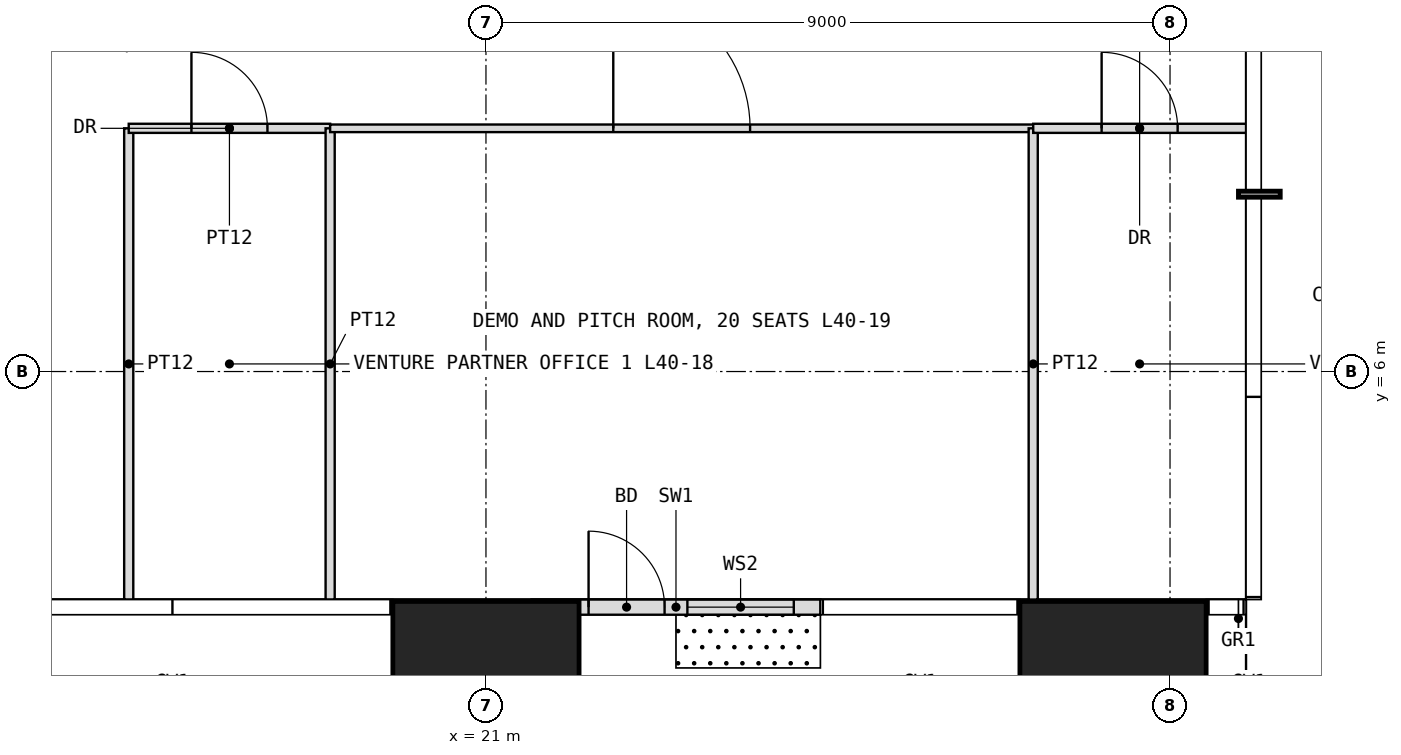
"""IFC4 building model, lengths in metres.
Left out: names, types, materials, properties, quantities, classifications, styles, units other than length and angle.
Written with IfcOpenShell. Run it as: python <this file> out.ifc"""

import sys

from ifc_helpers import new_model, si_unit, direction, frame, frame_2d, origin, origin_2d, place, context, subcontext, project, spatial, rectangle, extrude, element, fill, save


model = new_model("IFC4")
c1 = context("Model", 3, precision=1e-05, world=origin(), true_north=direction((0.0, 1.0)))
c2 = subcontext(c1, "Body", "Model", "MODEL_VIEW")
j1 = project(units=[si_unit("LENGTHUNIT", "METRE"), si_unit("PLANEANGLEUNIT", "RADIAN")], contexts=[c1])
p1 = place(None, origin())
s1 = spatial("IfcSite", under=j1, at=p1, CompositionType="ELEMENT")
p2 = place(p1, origin())
s2 = spatial("IfcBuilding", under=s1, at=p2, CompositionType="ELEMENT")
p3 = place(p2, frame((0.0, 0.0, 170.5)))
s3 = spatial("IfcBuildingStorey", under=s2, at=p3, CompositionType="ELEMENT", Elevation=170.5)
for number, where, z_axis, x_axis in (
    (1, (21.0, 1.75, 0.0), (0.0, 0.0, 1.0), (1.0, 0.0, 0.0)),
    (2, (29.25, 1.75, 0.0), (0.0, 0.0, 1.0), (1.0, 0.0, 0.0)),
):
    element("IfcColumn", number, at=place(p3, frame(where, z_axis=z_axis, x_axis=x_axis)), inside=s3, PredefinedType="COLUMN", context=c2, shape_type="SweptSolid", body=[
        extrude(rectangle(XDim=2.45, YDim=2.45, at=origin_2d()), origin(), (0.0, 0.0, 1.0), 4.0),
    ])
p4 = place(p3, frame((21.6, 2.9, 0.0), z_axis=(0.0, 0.0, 1.0), x_axis=(1.0, 0.0, 0.0)))
e3 = element("IfcWall", 3, at=p4, inside=s3, PredefinedType="USERDEFINED", context=c2, shape_type="SweptSolid", body=[
    extrude(rectangle(XDim=3.8, YDim=0.2, at=frame_2d((1.9, 0.0))), origin(), (0.0, 0.0, 1.0), 3.75),
])
p5 = place(p4, frame((0.75, 0.0, 0.0)))
e4 = element("IfcOpeningElement", 4, at=p5, cuts=e3, PredefinedType="OPENING", context=c2, shape_type="SweptSolid", body=[
    extrude(rectangle(XDim=1.0, YDim=2.4, at=frame_2d((0.5, 1.2))), frame((0.0, 0.11, 0.0), z_axis=(0.0, -1.0, 0.0), x_axis=(1.0, 0.0, 0.0)), (0.0, 0.0, 1.0), 0.22),
])
p6 = place(p4, frame((2.05, 0.0, 0.3)))
e5 = element("IfcOpeningElement", 5, at=p6, cuts=e3, PredefinedType="OPENING", context=c2, shape_type="SweptSolid", body=[
    extrude(rectangle(XDim=1.4, YDim=2.7, at=frame_2d((0.7, 1.35))), frame((0.0, 0.11, 0.0), z_axis=(0.0, -1.0, 0.0), x_axis=(1.0, 0.0, 0.0)), (0.0, 0.0, 1.0), 0.22),
])
p7 = place(p3, frame((16.3, 3.0, 0.0), z_axis=(0.0, 0.0, 1.0), x_axis=(0.0, 1.0, 0.0)))
e6 = element("IfcWall", 6, at=p7, inside=s3, PredefinedType="PARTITIONING", context=c2, shape_type="SweptSolid", body=[
    extrude(rectangle(XDim=6.2, YDim=0.12, at=frame_2d((3.1, 0.0))), origin(), (0.0, 0.0, 1.0), 3.75),
])
p8 = place(p3, frame((16.3, 9.2, 0.0), z_axis=(0.0, 0.0, 1.0), x_axis=(1.0, 0.0, 0.0)))
e7 = element("IfcWall", 7, at=p8, inside=s3, PredefinedType="PARTITIONING", context=c2, shape_type="SweptSolid", body=[
    extrude(rectangle(XDim=2.65, YDim=0.12, at=frame_2d((1.325, 0.0))), origin(), (0.0, 0.0, 1.0), 3.75),
])
p9 = place(p8, frame((0.825, 0.0, 0.0)))
e8 = element("IfcOpeningElement", 8, at=p9, cuts=e7, PredefinedType="OPENING", context=c2, shape_type="SweptSolid", body=[
    extrude(rectangle(XDim=1.0, YDim=2.2, at=frame_2d((0.5, 1.1))), frame((0.0, 0.07, 0.0), z_axis=(0.0, -1.0, 0.0), x_axis=(1.0, 0.0, 0.0)), (0.0, 0.0, 1.0), 0.14),
])
p10 = place(p3, frame((18.95, 3.0, 0.0), z_axis=(0.0, 0.0, 1.0), x_axis=(0.0, 1.0, 0.0)))
e9 = element("IfcWall", 9, at=p10, inside=s3, PredefinedType="PARTITIONING", context=c2, shape_type="SweptSolid", body=[
    extrude(rectangle(XDim=6.2, YDim=0.12, at=frame_2d((3.1, 0.0))), origin(), (0.0, 0.0, 1.0), 3.75),
])
p11 = place(p3, frame((18.95, 9.2, 0.0), z_axis=(0.0, 0.0, 1.0), x_axis=(1.0, 0.0, 0.0)))
e10 = element("IfcWall", 10, at=p11, inside=s3, PredefinedType="PARTITIONING", context=c2, shape_type="SweptSolid", body=[
    extrude(rectangle(XDim=9.25, YDim=0.1, at=frame_2d((4.625, 0.0))), origin(), (0.0, 0.0, 1.0), 3.75),
])
p12 = place(p11, frame((3.725, 0.0, 0.0)))
e11 = element("IfcOpeningElement", 11, at=p12, cuts=e10, PredefinedType="OPENING", context=c2, shape_type="SweptSolid", body=[
    extrude(rectangle(XDim=1.8, YDim=2.4, at=frame_2d((0.9, 1.2))), frame((0.0, 0.06, 0.0), z_axis=(0.0, -1.0, 0.0), x_axis=(1.0, 0.0, 0.0)), (0.0, 0.0, 1.0), 0.12),
])
p13 = place(p3, frame((28.2, 3.0, 0.0), z_axis=(0.0, 0.0, 1.0), x_axis=(0.0, 1.0, 0.0)))
e12 = element("IfcWall", 12, at=p13, inside=s3, PredefinedType="PARTITIONING", context=c2, shape_type="SweptSolid", body=[
    extrude(rectangle(XDim=6.2, YDim=0.12, at=frame_2d((3.1, 0.0))), origin(), (0.0, 0.0, 1.0), 3.75),
])
p14 = place(p3, frame((28.2, 9.2, 0.0), z_axis=(0.0, 0.0, 1.0), x_axis=(1.0, 0.0, 0.0)))
e13 = element("IfcWall", 13, at=p14, inside=s3, PredefinedType="PARTITIONING", context=c2, shape_type="SweptSolid", body=[
    extrude(rectangle(XDim=2.8, YDim=0.12, at=frame_2d((1.4, 0.0))), origin(), (0.0, 0.0, 1.0), 3.75),
])
p15 = place(p14, frame((0.9, 0.0, 0.0)))
e14 = element("IfcOpeningElement", 14, at=p15, cuts=e13, PredefinedType="OPENING", context=c2, shape_type="SweptSolid", body=[
    extrude(rectangle(XDim=1.0, YDim=2.2, at=frame_2d((0.5, 1.1))), frame((0.0, 0.07, 0.0), z_axis=(0.0, -1.0, 0.0), x_axis=(1.0, 0.0, 0.0)), (0.0, 0.0, 1.0), 0.14),
])
p16 = place(p5, origin())
e15 = element("IfcDoor", 15, at=p16, inside=s3, OperationType="SINGLE_SWING_LEFT", PredefinedType="DOOR", context=c2, shape_type="SweptSolid", body=[
    extrude(rectangle(XDim=1.0, YDim=2.4, at=frame_2d((0.5, 1.2))), frame((0.0, 0.025, 0.0), z_axis=(0.0, -1.0, 0.0), x_axis=(1.0, 0.0, 0.0)), (0.0, 0.0, 1.0), 0.05),
])
fill(e4, e15)
p17 = place(p6, origin())
e16 = element("IfcWindow", 16, at=p17, inside=s3, PartitioningType="SINGLE_PANEL", PredefinedType="WINDOW", context=c2, shape_type="SweptSolid", body=[
    extrude(rectangle(XDim=1.4, YDim=2.7, at=frame_2d((0.7, 1.35))), frame((0.0, 0.03, 0.0), z_axis=(0.0, -1.0, 0.0), x_axis=(1.0, 0.0, 0.0)), (0.0, 0.0, 1.0), 0.06),
])
fill(e5, e16)
p18 = place(p9, origin())
e17 = element("IfcDoor", 17, at=p18, inside=s3, OperationType="SINGLE_SWING_LEFT", PredefinedType="DOOR", context=c2, shape_type="SweptSolid", body=[
    extrude(rectangle(XDim=1.0, YDim=2.2, at=frame_2d((0.5, 1.1))), frame((0.0, 0.025, 0.0), z_axis=(0.0, -1.0, 0.0), x_axis=(1.0, 0.0, 0.0)), (0.0, 0.0, 1.0), 0.05),
])
fill(e8, e17)
p19 = place(p12, origin())
e18 = element("IfcDoor", 18, at=p19, inside=s3, OperationType="DOUBLE_DOOR_SINGLE_SWING", PredefinedType="DOOR", context=c2, shape_type="SweptSolid", body=[
    extrude(rectangle(XDim=1.8, YDim=2.4, at=frame_2d((0.9, 1.2))), frame((0.0, 0.025, 0.0), z_axis=(0.0, -1.0, 0.0), x_axis=(1.0, 0.0, 0.0)), (0.0, 0.0, 1.0), 0.05),
])
fill(e11, e18)
p20 = place(p15, origin())
e19 = element("IfcDoor", 19, at=p20, inside=s3, OperationType="SINGLE_SWING_LEFT", PredefinedType="DOOR", context=c2, shape_type="SweptSolid", body=[
    extrude(rectangle(XDim=1.0, YDim=2.2, at=frame_2d((0.5, 1.1))), frame((0.0, 0.025, 0.0), z_axis=(0.0, -1.0, 0.0), x_axis=(1.0, 0.0, 0.0)), (0.0, 0.0, 1.0), 0.05),
])
fill(e14, e19)
save(model, sys.argv[1])
